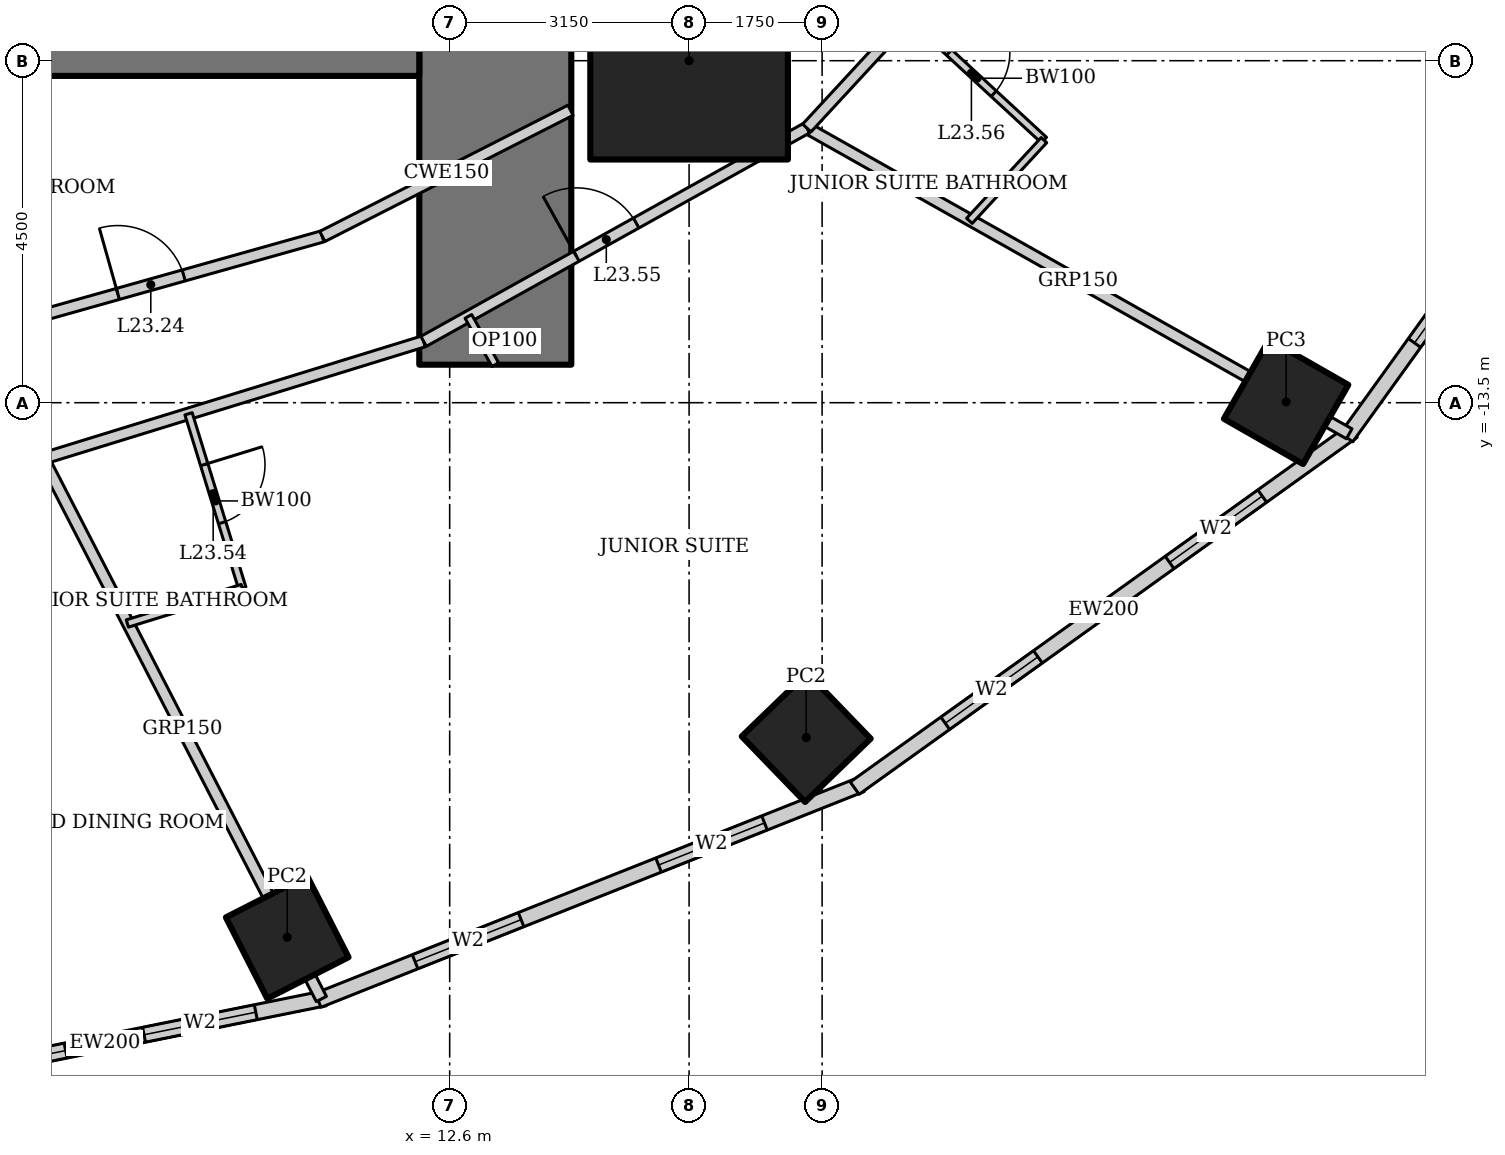
"""IFC4 building model, lengths in metres.
Left out: names, types, materials, properties, quantities, classifications, styles, units other than length and angle.
Written with IfcOpenShell. Run it as: python <this file> out.ifc"""

import sys

from ifc_helpers import new_model, si_unit, direction, frame, frame_2d, origin, origin_2d, place, context, subcontext, project, spatial, rectangle, hollow_rectangle, extrude, element, fill, save


model = new_model("IFC4")
c1 = context("Model", 3, precision=1e-05, world=origin(), true_north=direction((0.0, 1.0)))
c2 = subcontext(c1, "Body", "Model", "MODEL_VIEW")
j1 = project(units=[si_unit("LENGTHUNIT", "METRE"), si_unit("PLANEANGLEUNIT", "RADIAN")], contexts=[c1])
p1 = place(None, origin())
s1 = spatial("IfcSite", under=j1, at=p1, CompositionType="ELEMENT")
p2 = place(p1, origin())
s2 = spatial("IfcBuilding", under=s1, at=p2, CompositionType="ELEMENT")
p3 = place(p2, frame((0.0, 0.0, 98.2)))
s3 = spatial("IfcBuildingStorey", under=s2, at=p3, CompositionType="ELEMENT", Elevation=98.2)
p4 = place(p3, frame((15.75, -9.0, 0.0), z_axis=(0.0, 0.0, 1.0), x_axis=(1.0, 0.0, 0.0)))
e1 = element("IfcColumn", 1, at=p4, inside=s3, PredefinedType="COLUMN", context=c2, shape_type="SweptSolid", body=[
    extrude(hollow_rectangle(XDim=2.6, YDim=2.6, WallThickness=0.13, at=origin_2d()), origin(), (0.0, 0.0, 1.0), 3.6),
])
for number, where, z_axis, x_axis in (
    (2, (10.463, -20.534, 0.0), (0.0, 0.0, 1.0), (0.891, 0.454, 0.0)),
    (3, (17.291, -17.905, 0.0), (0.0, 0.0, 1.0), (0.719, 0.695, 0.0)),
):
    element("IfcColumn", number, at=place(p3, frame(where, z_axis=z_axis, x_axis=x_axis)), inside=s3, PredefinedType="COLUMN", context=c2, shape_type="SweptSolid", body=[
        extrude(hollow_rectangle(XDim=1.2, YDim=1.2, WallThickness=0.1, at=origin_2d()), origin(), (0.0, 0.0, 1.0), 3.6),
    ])
p5 = place(p3, frame((23.605, -13.489, 0.0), z_axis=(0.0, 0.0, 1.0), x_axis=(0.496139221777, 0.86824298017, 0.0)))
e4 = element("IfcColumn", 4, at=p5, inside=s3, PredefinedType="COLUMN", context=c2, shape_type="SweptSolid", body=[
    extrude(hollow_rectangle(XDim=1.2, YDim=1.2, WallThickness=0.12, at=origin_2d()), origin(), (0.0, 0.0, 1.0), 3.6),
])
p6 = place(p3, frame((13.2, -13.0, 0.0), z_axis=(0.0, 0.0, 1.0), x_axis=(0.0, 1.0, 0.0)))
e5 = element("IfcWall", 5, at=p6, inside=s3, PredefinedType="SHEAR", context=c2, shape_type="SweptSolid", body=[
    extrude(rectangle(XDim=26.0, YDim=2.0, at=frame_2d((13.0, 0.0))), origin(), (0.0, 0.0, 1.0), 3.6),
])
p7 = place(p6, frame((12.1, 0.0, 0.0)))
e6 = element("IfcOpeningElement", 6, at=p7, cuts=e5, PredefinedType="OPENING", context=c2, shape_type="SweptSolid", body=[
    extrude(rectangle(XDim=1.8, YDim=2.1, at=frame_2d((0.9, 1.05))), frame((0.0, 1.01, 0.0), z_axis=(0.0, -1.0, 0.0), x_axis=(1.0, 0.0, 0.0)), (0.0, 0.0, 1.0), 2.02),
])
p8 = place(p3, frame((-12.2, -8.0, 0.0), z_axis=(0.0, 0.0, 1.0), x_axis=(1.0, 0.0, 0.0)))
e7 = element("IfcWall", 7, at=p8, inside=s3, PredefinedType="SHEAR", context=c2, shape_type="SweptSolid", body=[
    extrude(rectangle(XDim=24.4, YDim=2.4, at=frame_2d((12.2, 0.0))), origin(), (0.0, 0.0, 1.0), 3.6),
])
p9 = place(p3, frame((5.17, -22.504, 0.0), z_axis=(0.0, 0.0, 1.0), x_axis=(0.980251657452, 0.197754110105, 0.0)))
e8 = element("IfcWall", 8, at=p9, inside=s3, PredefinedType="SOLIDWALL", context=c2, shape_type="SweptSolid", body=[
    extrude(rectangle(XDim=5.904, YDim=0.2, at=frame_2d((2.952, 0.0))), origin(), (0.0, 0.0, 1.0), 3.45),
])
p10 = place(p9, frame((0.926, 0.0, 0.5)))
e9 = element("IfcOpeningElement", 9, at=p10, cuts=e8, PredefinedType="OPENING", context=c2, shape_type="SweptSolid", body=[
    extrude(rectangle(XDim=1.5, YDim=2.2, at=frame_2d((0.75, 1.1))), frame((0.0, 0.11, 0.0), z_axis=(0.0, -1.0, 0.0), x_axis=(1.0, 0.0, 0.0)), (0.0, 0.0, 1.0), 0.22),
])
p11 = place(p9, frame((3.478, 0.0, 0.5)))
e10 = element("IfcOpeningElement", 10, at=p11, cuts=e8, PredefinedType="OPENING", context=c2, shape_type="SweptSolid", body=[
    extrude(rectangle(XDim=1.5, YDim=2.2, at=frame_2d((0.75, 1.1))), frame((0.0, 0.11, 0.0), z_axis=(0.0, -1.0, 0.0), x_axis=(1.0, 0.0, 0.0)), (0.0, 0.0, 1.0), 0.22),
])
p12 = place(p3, frame((10.869, -21.363, 0.0), z_axis=(0.0, 0.0, 1.0), x_axis=(0.929358351251, 0.369178892895, 0.0)))
e11 = element("IfcWall", 11, at=p12, inside=s3, PredefinedType="SOLIDWALL", context=c2, shape_type="SweptSolid", body=[
    extrude(rectangle(XDim=7.692, YDim=0.2, at=frame_2d((3.846, 0.0))), origin(), (0.0, 0.0, 1.0), 3.45),
])
p13 = place(p12, frame((1.373, 0.0, 0.5)))
e12 = element("IfcOpeningElement", 12, at=p13, cuts=e11, PredefinedType="OPENING", context=c2, shape_type="SweptSolid", body=[
    extrude(rectangle(XDim=1.5, YDim=2.2, at=frame_2d((0.75, 1.1))), frame((0.0, 0.11, 0.0), z_axis=(0.0, -1.0, 0.0), x_axis=(1.0, 0.0, 0.0)), (0.0, 0.0, 1.0), 0.22),
])
p14 = place(p12, frame((4.819, 0.0, 0.5)))
e13 = element("IfcOpeningElement", 13, at=p14, cuts=e11, PredefinedType="OPENING", context=c2, shape_type="SweptSolid", body=[
    extrude(rectangle(XDim=1.5, YDim=2.2, at=frame_2d((0.75, 1.1))), frame((0.0, 0.11, 0.0), z_axis=(0.0, -1.0, 0.0), x_axis=(1.0, 0.0, 0.0)), (0.0, 0.0, 1.0), 0.22),
])
p15 = place(p3, frame((17.929, -18.572, 0.0), z_axis=(0.0, 0.0, 1.0), x_axis=(0.812791321576, 0.582554948112, 0.0)))
e14 = element("IfcWall", 14, at=p15, inside=s3, PredefinedType="SOLIDWALL", context=c2, shape_type="SweptSolid", body=[
    extrude(rectangle(XDim=8.063, YDim=0.2, at=frame_2d((4.032, 0.0))), origin(), (0.0, 0.0, 1.0), 3.45),
])
p16 = place(p15, frame((1.466, 0.0, 0.5)))
e15 = element("IfcOpeningElement", 15, at=p16, cuts=e14, PredefinedType="OPENING", context=c2, shape_type="SweptSolid", body=[
    extrude(rectangle(XDim=1.5, YDim=2.2, at=frame_2d((0.75, 1.1))), frame((0.0, 0.11, 0.0), z_axis=(0.0, -1.0, 0.0), x_axis=(1.0, 0.0, 0.0)), (0.0, 0.0, 1.0), 0.22),
])
p17 = place(p15, frame((5.097, 0.0, 0.5)))
e16 = element("IfcOpeningElement", 16, at=p17, cuts=e14, PredefinedType="OPENING", context=c2, shape_type="SweptSolid", body=[
    extrude(rectangle(XDim=1.5, YDim=2.2, at=frame_2d((0.75, 1.1))), frame((0.0, 0.11, 0.0), z_axis=(0.0, -1.0, 0.0), x_axis=(1.0, 0.0, 0.0)), (0.0, 0.0, 1.0), 0.22),
])
p18 = place(p3, frame((24.4, -13.957, 0.0), z_axis=(0.0, 0.0, 1.0), x_axis=(0.583937613703, 0.811798536155, 0.0)))
e17 = element("IfcWall", 17, at=p18, inside=s3, PredefinedType="SOLIDWALL", context=c2, shape_type="SweptSolid", body=[
    extrude(rectangle(XDim=8.323, YDim=0.2, at=frame_2d((4.162, 0.0))), origin(), (0.0, 0.0, 1.0), 3.45),
])
p19 = place(p18, frame((1.531, 0.0, 0.5)))
e18 = element("IfcOpeningElement", 18, at=p19, cuts=e17, PredefinedType="OPENING", context=c2, shape_type="SweptSolid", body=[
    extrude(rectangle(XDim=1.5, YDim=2.2, at=frame_2d((0.75, 1.1))), frame((0.0, 0.11, 0.0), z_axis=(0.0, -1.0, 0.0), x_axis=(1.0, 0.0, 0.0)), (0.0, 0.0, 1.0), 0.22),
])
p20 = place(p18, frame((5.292, 0.0, 0.5)))
e19 = element("IfcOpeningElement", 19, at=p20, cuts=e17, PredefinedType="OPENING", context=c2, shape_type="SweptSolid", body=[
    extrude(rectangle(XDim=1.5, YDim=2.2, at=frame_2d((0.75, 1.1))), frame((0.0, 0.11, 0.0), z_axis=(0.0, -1.0, 0.0), x_axis=(1.0, 0.0, 0.0)), (0.0, 0.0, 1.0), 0.22),
])
p21 = place(p3, frame((10.912, -21.346, 0.0), z_axis=(0.0, 0.0, 1.0), x_axis=(-0.45752665959, 0.889195904042, 0.0)))
e20 = element("IfcWall", 20, at=p21, inside=s3, PredefinedType="PARTITIONING", context=c2, shape_type="SweptSolid", body=[
    extrude(rectangle(XDim=7.997, YDim=0.15, at=frame_2d((3.999, 0.0))), origin(), (0.0, 0.0, 1.0), 2.528),
])
p22 = place(p3, frame((24.435, -13.909, 0.0), z_axis=(0.0, 0.0, 1.0), x_axis=(-0.871075246657, 0.491149584813, 0.0)))
e21 = element("IfcWall", 21, at=p22, inside=s3, PredefinedType="PARTITIONING", context=c2, shape_type="SweptSolid", body=[
    extrude(rectangle(XDim=8.192, YDim=0.15, at=frame_2d((4.096, 0.0))), origin(), (0.0, 0.0, 1.0), 2.693),
])
p23 = place(p3, frame((7.253, -14.235, 0.0), z_axis=(0.0, 0.0, 1.0), x_axis=(0.955657956744, 0.294478980085, 0.0)))
e22 = element("IfcWall", 22, at=p23, inside=s3, PredefinedType="PARTITIONING", context=c2, shape_type="SweptSolid", body=[
    extrude(rectangle(XDim=5.236, YDim=0.15, at=frame_2d((2.618, 0.0))), origin(), (0.0, 0.0, 1.0), 3.45),
])
p24 = place(p3, frame((12.257, -12.693, 0.0), z_axis=(0.0, 0.0, 1.0), x_axis=(0.873695910579, 0.486472461541, 0.0)))
e23 = element("IfcWall", 23, at=p24, inside=s3, PredefinedType="PARTITIONING", context=c2, shape_type="SweptSolid", body=[
    extrude(rectangle(XDim=5.771, YDim=0.15, at=frame_2d((2.885, 0.0))), origin(), (0.0, 0.0, 1.0), 3.45),
])
p25 = place(p24, frame((2.301, 0.0, 0.0)))
e24 = element("IfcOpeningElement", 24, at=p25, cuts=e23, PredefinedType="OPENING", context=c2, shape_type="SweptSolid", body=[
    extrude(rectangle(XDim=0.9, YDim=2.1, at=frame_2d((0.45, 1.05))), frame((0.0, 0.085, 0.0), z_axis=(0.0, -1.0, 0.0), x_axis=(1.0, 0.0, 0.0)), (0.0, 0.0, 1.0), 0.17),
])
p26 = place(p3, frame((17.299, -9.885, 0.0), z_axis=(0.0, 0.0, 1.0), x_axis=(0.678641806296, 0.734469399463, 0.0)))
e25 = element("IfcWall", 25, at=p26, inside=s3, PredefinedType="PARTITIONING", context=c2, shape_type="SweptSolid", body=[
    extrude(rectangle(XDim=6.166, YDim=0.15, at=frame_2d((3.083, 0.0))), origin(), (0.0, 0.0, 1.0), 3.45),
])
p27 = place(p3, frame((6.411, -12.582, 0.0), z_axis=(0.0, 0.0, 1.0), x_axis=(0.962643729928, 0.270771211967, 0.0)))
e26 = element("IfcWall", 26, at=p27, inside=s3, PredefinedType="PARTITIONING", context=c2, shape_type="SweptSolid", body=[
    extrude(rectangle(XDim=4.688, YDim=0.15, at=frame_2d((2.344, 0.0))), origin(), (0.0, 0.0, 1.0), 3.45),
])
p28 = place(p27, frame((1.894, 0.0, 0.0)))
e27 = element("IfcOpeningElement", 27, at=p28, cuts=e26, PredefinedType="OPENING", context=c2, shape_type="SweptSolid", body=[
    extrude(rectangle(XDim=0.9, YDim=2.1, at=frame_2d((0.45, 1.05))), frame((0.0, 0.085, 0.0), z_axis=(0.0, -1.0, 0.0), x_axis=(1.0, 0.0, 0.0)), (0.0, 0.0, 1.0), 0.17),
])
p29 = place(p3, frame((9.164, -13.646, 0.0), z_axis=(0.0, 0.0, 1.0), x_axis=(0.294507586191, -0.955649141514, 0.0)))
e28 = element("IfcWall", 28, at=p29, inside=s3, PredefinedType="PARTITIONING", context=c2, shape_type="SweptSolid", body=[
    extrude(rectangle(XDim=2.4, YDim=0.1, at=frame_2d((1.2, 0.0))), origin(), (0.0, 0.0, 1.0), 3.45),
])
p30 = place(p29, frame((0.7, 0.0, 0.0)))
e29 = element("IfcOpeningElement", 29, at=p30, cuts=e28, PredefinedType="OPENING", context=c2, shape_type="SweptSolid", body=[
    extrude(rectangle(XDim=0.8, YDim=2.1, at=frame_2d((0.4, 1.05))), frame((0.0, 0.06, 0.0), z_axis=(0.0, -1.0, 0.0), x_axis=(1.0, 0.0, 0.0)), (0.0, 0.0, 1.0), 0.12),
])
p31 = place(p3, frame((9.871, -15.939, 0.0), z_axis=(0.0, 0.0, 1.0), x_axis=(-0.955642133669, -0.29453032502, 0.0)))
e30 = element("IfcWall", 30, at=p31, inside=s3, PredefinedType="PARTITIONING", context=c2, shape_type="SweptSolid", body=[
    extrude(rectangle(XDim=1.583, YDim=0.1, at=frame_2d((0.791, 0.0))), origin(), (0.0, 0.0, 1.0), 3.45),
])
p32 = place(p3, frame((18.656, -8.416, 0.0), z_axis=(0.0, 0.0, 1.0), x_axis=(0.73447964986, -0.678630712495, 0.0)))
e31 = element("IfcWall", 31, at=p32, inside=s3, PredefinedType="PARTITIONING", context=c2, shape_type="SweptSolid", body=[
    extrude(rectangle(XDim=2.4, YDim=0.1, at=frame_2d((1.2, 0.0))), origin(), (0.0, 0.0, 1.0), 3.45),
])
p33 = place(p32, frame((0.7, 0.0, 0.0)))
e32 = element("IfcOpeningElement", 32, at=p33, cuts=e31, PredefinedType="OPENING", context=c2, shape_type="SweptSolid", body=[
    extrude(rectangle(XDim=0.8, YDim=2.1, at=frame_2d((0.4, 1.05))), frame((0.0, 0.06, 0.0), z_axis=(0.0, -1.0, 0.0), x_axis=(1.0, 0.0, 0.0)), (0.0, 0.0, 1.0), 0.12),
])
p34 = place(p3, frame((20.419, -10.045, 0.0), z_axis=(0.0, 0.0, 1.0), x_axis=(-0.67861657312, -0.734492713842, 0.0)))
e33 = element("IfcWall", 33, at=p34, inside=s3, PredefinedType="PARTITIONING", context=c2, shape_type="SweptSolid", body=[
    extrude(rectangle(XDim=1.446, YDim=0.1, at=frame_2d((0.723, 0.0))), origin(), (0.0, 0.0, 1.0), 3.45),
])
p35 = place(p3, frame((13.2, -13.0, 0.0), z_axis=(0.0, 0.0, 1.0), x_axis=(-0.486383760903, 0.873745293051, 0.0)))
e34 = element("IfcWall", 34, at=p35, inside=s3, PredefinedType="PARTITIONING", context=c2, shape_type="SweptSolid", body=[
    extrude(rectangle(XDim=0.727, YDim=0.1, at=frame_2d((0.364, 0.0))), origin(), (0.0, 0.0, 1.0), 3.45),
])
p36 = place(p3, frame((10.924, -11.312, 0.0), z_axis=(0.0, 0.0, 1.0), x_axis=(0.891394713219, 0.453227829292, 0.0)))
e35 = element("IfcWall", 35, at=p36, inside=s3, PredefinedType="PARTITIONING", context=c2, shape_type="SweptSolid", body=[
    extrude(rectangle(XDim=3.664, YDim=0.15, at=frame_2d((1.832, 0.0))), origin(), (0.0, 0.0, 1.0), 3.45),
])
p37 = place(p10, origin())
e36 = element("IfcWindow", 36, at=p37, inside=s3, PartitioningType="SINGLE_PANEL", PredefinedType="WINDOW", context=c2, shape_type="SweptSolid", body=[
    extrude(rectangle(XDim=1.5, YDim=2.2, at=frame_2d((0.75, 1.1))), frame((0.0, 0.03, 0.0), z_axis=(0.0, -1.0, 0.0), x_axis=(1.0, 0.0, 0.0)), (0.0, 0.0, 1.0), 0.06),
])
fill(e9, e36)
p38 = place(p11, origin())
e37 = element("IfcWindow", 37, at=p38, inside=s3, PartitioningType="SINGLE_PANEL", PredefinedType="WINDOW", context=c2, shape_type="SweptSolid", body=[
    extrude(rectangle(XDim=1.5, YDim=2.2, at=frame_2d((0.75, 1.1))), frame((0.0, 0.03, 0.0), z_axis=(0.0, -1.0, 0.0), x_axis=(1.0, 0.0, 0.0)), (0.0, 0.0, 1.0), 0.06),
])
fill(e10, e37)
p39 = place(p13, origin())
e38 = element("IfcWindow", 38, at=p39, inside=s3, PartitioningType="SINGLE_PANEL", PredefinedType="WINDOW", context=c2, shape_type="SweptSolid", body=[
    extrude(rectangle(XDim=1.5, YDim=2.2, at=frame_2d((0.75, 1.1))), frame((0.0, 0.03, 0.0), z_axis=(0.0, -1.0, 0.0), x_axis=(1.0, 0.0, 0.0)), (0.0, 0.0, 1.0), 0.06),
])
fill(e12, e38)
p40 = place(p14, origin())
e39 = element("IfcWindow", 39, at=p40, inside=s3, PartitioningType="SINGLE_PANEL", PredefinedType="WINDOW", context=c2, shape_type="SweptSolid", body=[
    extrude(rectangle(XDim=1.5, YDim=2.2, at=frame_2d((0.75, 1.1))), frame((0.0, 0.03, 0.0), z_axis=(0.0, -1.0, 0.0), x_axis=(1.0, 0.0, 0.0)), (0.0, 0.0, 1.0), 0.06),
])
fill(e13, e39)
p41 = place(p16, origin())
e40 = element("IfcWindow", 40, at=p41, inside=s3, PartitioningType="SINGLE_PANEL", PredefinedType="WINDOW", context=c2, shape_type="SweptSolid", body=[
    extrude(rectangle(XDim=1.5, YDim=2.2, at=frame_2d((0.75, 1.1))), frame((0.0, 0.03, 0.0), z_axis=(0.0, -1.0, 0.0), x_axis=(1.0, 0.0, 0.0)), (0.0, 0.0, 1.0), 0.06),
])
fill(e15, e40)
p42 = place(p17, origin())
e41 = element("IfcWindow", 41, at=p42, inside=s3, PartitioningType="SINGLE_PANEL", PredefinedType="WINDOW", context=c2, shape_type="SweptSolid", body=[
    extrude(rectangle(XDim=1.5, YDim=2.2, at=frame_2d((0.75, 1.1))), frame((0.0, 0.03, 0.0), z_axis=(0.0, -1.0, 0.0), x_axis=(1.0, 0.0, 0.0)), (0.0, 0.0, 1.0), 0.06),
])
fill(e16, e41)
p43 = place(p19, origin())
e42 = element("IfcWindow", 42, at=p43, inside=s3, PartitioningType="SINGLE_PANEL", PredefinedType="WINDOW", context=c2, shape_type="SweptSolid", body=[
    extrude(rectangle(XDim=1.5, YDim=2.2, at=frame_2d((0.75, 1.1))), frame((0.0, 0.03, 0.0), z_axis=(0.0, -1.0, 0.0), x_axis=(1.0, 0.0, 0.0)), (0.0, 0.0, 1.0), 0.06),
])
fill(e18, e42)
p44 = place(p28, origin())
e43 = element("IfcDoor", 43, at=p44, inside=s3, OperationType="SINGLE_SWING_LEFT", PredefinedType="DOOR", context=c2, shape_type="SweptSolid", body=[
    extrude(rectangle(XDim=0.9, YDim=2.1, at=frame_2d((0.45, 1.05))), frame((0.0, 0.025, 0.0), z_axis=(0.0, -1.0, 0.0), x_axis=(1.0, 0.0, 0.0)), (0.0, 0.0, 1.0), 0.05),
])
fill(e27, e43)
p45 = place(p30, origin())
e44 = element("IfcDoor", 44, at=p45, inside=s3, OperationType="SINGLE_SWING_LEFT", PredefinedType="DOOR", context=c2, shape_type="SweptSolid", body=[
    extrude(rectangle(XDim=0.8, YDim=2.1, at=frame_2d((0.4, 1.05))), frame((0.0, 0.025, 0.0), z_axis=(0.0, -1.0, 0.0), x_axis=(1.0, 0.0, 0.0)), (0.0, 0.0, 1.0), 0.05),
])
fill(e29, e44)
p46 = place(p25, origin())
e45 = element("IfcDoor", 45, at=p46, inside=s3, OperationType="SINGLE_SWING_LEFT", PredefinedType="DOOR", context=c2, shape_type="SweptSolid", body=[
    extrude(rectangle(XDim=0.9, YDim=2.1, at=frame_2d((0.45, 1.05))), frame((0.0, 0.025, 0.0), z_axis=(0.0, -1.0, 0.0), x_axis=(1.0, 0.0, 0.0)), (0.0, 0.0, 1.0), 0.05),
])
fill(e24, e45)
p47 = place(p33, origin())
e46 = element("IfcDoor", 46, at=p47, inside=s3, OperationType="SINGLE_SWING_LEFT", PredefinedType="DOOR", context=c2, shape_type="SweptSolid", body=[
    extrude(rectangle(XDim=0.8, YDim=2.1, at=frame_2d((0.4, 1.05))), frame((0.0, 0.025, 0.0), z_axis=(0.0, -1.0, 0.0), x_axis=(1.0, 0.0, 0.0)), (0.0, 0.0, 1.0), 0.05),
])
fill(e32, e46)
save(model, sys.argv[1])
